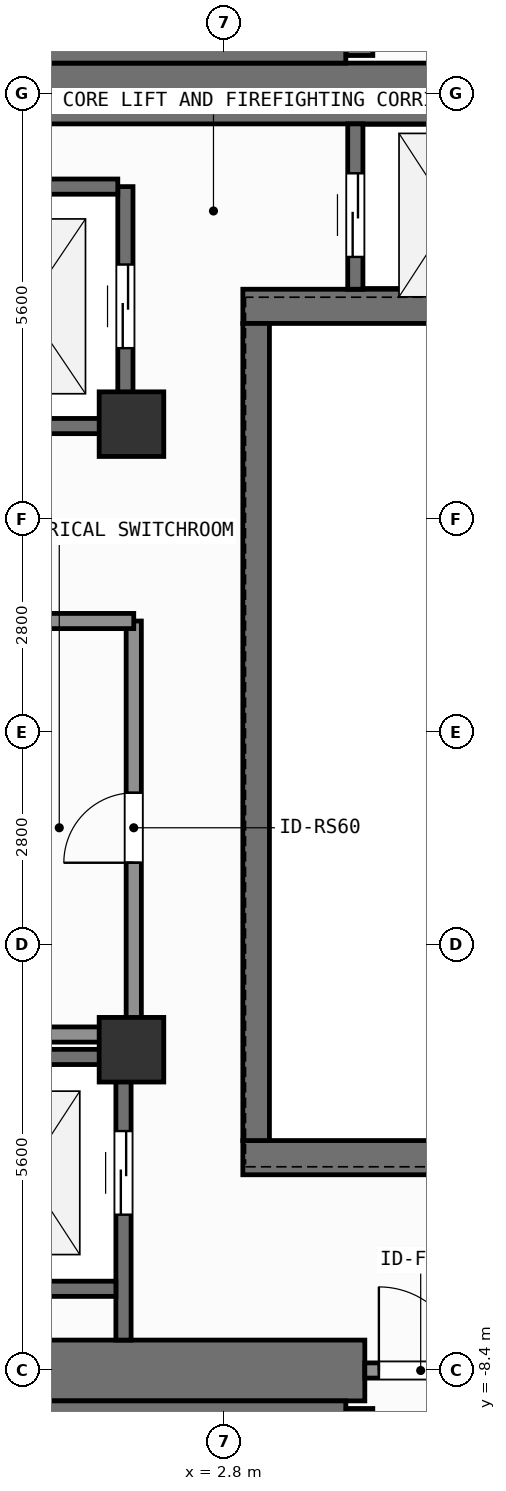
"""IFC4 building model, lengths in metres.
Left out: names, types, materials, properties, quantities, classifications, styles, units other than length and angle.
Written with IfcOpenShell. Run it as: python <this file> out.ifc"""

import sys

from ifc_helpers import new_model, si_unit, direction, frame, frame_2d, origin, origin_2d, place, context, subcontext, project, spatial, rectangle, extrude, element, fill, save


model = new_model("IFC4")
c1 = context("Model", 3, precision=1e-05, world=origin(), true_north=direction((0.0, 1.0)))
c2 = subcontext(c1, "Body", "Model", "MODEL_VIEW")
j1 = project(units=[si_unit("LENGTHUNIT", "METRE"), si_unit("PLANEANGLEUNIT", "RADIAN")], contexts=[c1])
p1 = place(None, origin())
s1 = spatial("IfcSite", under=j1, at=p1, CompositionType="ELEMENT")
p2 = place(p1, origin())
s2 = spatial("IfcBuilding", under=s1, at=p2, CompositionType="ELEMENT")
p3 = place(p2, frame((0.0, 0.0, 187.5)))
s3 = spatial("IfcBuildingStorey", under=s2, at=p3, CompositionType="ELEMENT", Elevation=187.5)
p4 = place(p3, frame((-2.62, -8.4, 0.0), z_axis=(0.0, 0.0, 1.0), x_axis=(1.0, 0.0, 0.0)))
e1 = element("IfcWall", 1, at=p4, inside=s3, PredefinedType="SHEAR", context=c2, shape_type="SweptSolid", body=[
    extrude(rectangle(XDim=7.27, YDim=0.8, at=frame_2d((3.635, 0.0))), origin(), (0.0, 0.0, 1.0), 3.9),
])
p5 = place(p3, frame((-7.55, 8.4, 0.0), z_axis=(0.0, 0.0, 1.0), x_axis=(1.0, 0.0, 0.0)))
e2 = element("IfcWall", 2, at=p5, inside=s3, PredefinedType="SHEAR", context=c2, shape_type="SweptSolid", body=[
    extrude(rectangle(XDim=16.35, YDim=0.8, at=frame_2d((8.175, 0.0))), origin(), (0.0, 0.0, 1.0), 3.9),
])
for number, where, z_axis, x_axis in (
    (3, (3.045, -5.6, 0.0), (0.0, 0.0, 1.0), (1.0, 0.0, 0.0)),
    (4, (3.045, 5.6, 0.0), (0.0, 0.0, 1.0), (1.0, 0.0, 0.0)),
):
    element("IfcWall", number, at=place(p3, frame(where, z_axis=z_axis, x_axis=x_axis)), inside=s3, PredefinedType="SHEAR", context=c2, shape_type="SweptSolid", body=[
        extrude(rectangle(XDim=5.755, YDim=0.45, at=frame_2d((2.877, 0.0))), origin(), (0.0, 0.0, 1.0), 3.9),
    ])
p6 = place(p3, frame((3.22, -5.375, 0.0), z_axis=(0.0, 0.0, 1.0), x_axis=(0.0, 1.0, 0.0)))
e5 = element("IfcWall", 5, at=p6, inside=s3, PredefinedType="SHEAR", context=c2, shape_type="SweptSolid", body=[
    extrude(rectangle(XDim=10.75, YDim=0.35, at=frame_2d((5.375, 0.0))), origin(), (0.0, 0.0, 1.0), 3.9),
])
p7 = place(p3, frame((-2.2, -8.913, 0.0), z_axis=(0.0, 0.0, 1.0), x_axis=(1.0, 0.0, 0.0)))
e6 = element("IfcWall", 6, at=p7, inside=s3, PredefinedType="SHEAR", context=c2, shape_type="SweptSolid", body=[
    extrude(rectangle(XDim=6.6, YDim=0.225, at=frame_2d((3.3, 0.0))), origin(), (0.0, 0.0, 1.0), 3.9),
])
p8 = place(p3, frame((4.58, -8.9, 0.0), z_axis=(0.0, 0.0, 1.0), x_axis=(0.0, -1.0, 0.0)))
e7 = element("IfcWall", 7, at=p8, inside=s3, PredefinedType="SHEAR", context=c2, shape_type="SweptSolid", body=[
    extrude(rectangle(XDim=2.925, YDim=0.35, at=frame_2d((1.462, 0.0))), origin(), (0.0, 0.0, 1.0), 3.9),
])
p9 = place(p8, frame((0.913, 0.0, 0.0)))
e8 = element("IfcOpeningElement", 8, at=p9, cuts=e7, PredefinedType="OPENING", context=c2, shape_type="SweptSolid", body=[
    extrude(rectangle(XDim=1.1, YDim=2.15, at=frame_2d((0.55, 1.075))), frame((0.0, 0.185, 0.0), z_axis=(0.0, -1.0, 0.0), x_axis=(1.0, 0.0, 0.0)), (0.0, 0.0, 1.0), 0.37),
])
p10 = place(p3, frame((-2.2, 8.913, 0.0), z_axis=(0.0, 0.0, 1.0), x_axis=(1.0, 0.0, 0.0)))
e9 = element("IfcWall", 9, at=p10, inside=s3, PredefinedType="SHEAR", context=c2, shape_type="SweptSolid", body=[
    extrude(rectangle(XDim=6.6, YDim=0.225, at=frame_2d((3.3, 0.0))), origin(), (0.0, 0.0, 1.0), 3.9),
])
p11 = place(p3, frame((4.58, 11.825, 0.0), z_axis=(0.0, 0.0, 1.0), x_axis=(0.0, -1.0, 0.0)))
e10 = element("IfcWall", 10, at=p11, inside=s3, PredefinedType="SHEAR", context=c2, shape_type="SweptSolid", body=[
    extrude(rectangle(XDim=2.925, YDim=0.35, at=frame_2d((1.462, 0.0))), origin(), (0.0, 0.0, 1.0), 3.9),
])
p12 = place(p11, frame((0.913, 0.0, 0.0)))
e11 = element("IfcOpeningElement", 11, at=p12, cuts=e10, PredefinedType="OPENING", context=c2, shape_type="SweptSolid", body=[
    extrude(rectangle(XDim=1.1, YDim=2.15, at=frame_2d((0.55, 1.075))), frame((0.0, 0.185, 0.0), z_axis=(0.0, -1.0, 0.0), x_axis=(1.0, 0.0, 0.0)), (0.0, 0.0, 1.0), 0.37),
])
for number, where, z_axis, x_axis in (
    (12, (1.58, -4.18, 0.0), (0.0, 0.0, 1.0), (1.0, 0.0, 0.0)),
    (13, (1.58, 4.05, 0.0), (0.0, 0.0, 1.0), (1.0, 0.0, 0.0)),
):
    element("IfcColumn", number, at=place(p3, frame(where, z_axis=z_axis, x_axis=x_axis)), inside=s3, PredefinedType="COLUMN", context=c2, shape_type="SweptSolid", body=[
        extrude(rectangle(XDim=0.85, YDim=0.85, at=origin_2d()), origin(), (0.0, 0.0, 1.0), 3.9),
    ])
p13 = place(p3, frame((1.5, 4.025, 0.0), z_axis=(0.0, 0.0, 1.0), x_axis=(0.0, 1.0, 0.0)))
e14 = element("IfcWall", 14, at=p13, inside=s3, PredefinedType="SHEAR", context=c2, shape_type="SweptSolid", body=[
    extrude(rectangle(XDim=3.15, YDim=0.2, at=frame_2d((1.575, 0.0))), origin(), (0.0, 0.0, 1.0), 3.62),
])
p14 = place(p13, frame((1.025, 0.0, 0.0)))
e15 = element("IfcOpeningElement", 15, at=p14, cuts=e14, PredefinedType="OPENING", context=c2, shape_type="SweptSolid", body=[
    extrude(rectangle(XDim=1.1, YDim=2.2, at=frame_2d((0.55, 1.1))), frame((0.0, 0.11, 0.0), z_axis=(0.0, -1.0, 0.0), x_axis=(1.0, 0.0, 0.0)), (0.0, 0.0, 1.0), 0.22),
])
for number, where, z_axis, x_axis in (
    (16, (-1.0, 4.025, 0.0), (0.0, 0.0, 1.0), (1.0, 0.0, 0.0)),
    (17, (-1.0, 7.175, 0.0), (0.0, 0.0, 1.0), (1.0, 0.0, 0.0)),
):
    element("IfcWall", number, at=place(p3, frame(where, z_axis=z_axis, x_axis=x_axis)), inside=s3, PredefinedType="SHEAR", context=c2, shape_type="SweptSolid", body=[
        extrude(rectangle(XDim=2.4, YDim=0.2, at=frame_2d((1.2, 0.0))), origin(), (0.0, 0.0, 1.0), 3.62),
    ])
p15 = place(p3, frame((1.475, -8.0, 0.0), z_axis=(0.0, 0.0, 1.0), x_axis=(0.0, 1.0, 0.0)))
e18 = element("IfcWall", 18, at=p15, inside=s3, PredefinedType="SHEAR", context=c2, shape_type="SweptSolid", body=[
    extrude(rectangle(XDim=3.725, YDim=0.2, at=frame_2d((1.863, 0.0))), origin(), (0.0, 0.0, 1.0), 3.62),
])
p16 = place(p15, frame((1.65, 0.0, 0.0)))
e19 = element("IfcOpeningElement", 19, at=p16, cuts=e18, PredefinedType="OPENING", context=c2, shape_type="SweptSolid", body=[
    extrude(rectangle(XDim=1.1, YDim=2.2, at=frame_2d((0.55, 1.1))), frame((0.0, 0.11, 0.0), z_axis=(0.0, -1.0, 0.0), x_axis=(1.0, 0.0, 0.0)), (0.0, 0.0, 1.0), 0.22),
])
for number, where, z_axis, x_axis in (
    (20, (-0.975, -7.325, 0.0), (0.0, 0.0, 1.0), (1.0, 0.0, 0.0)),
    (21, (-0.975, -4.275, 0.0), (0.0, 0.0, 1.0), (1.0, 0.0, 0.0)),
):
    element("IfcWall", number, at=place(p3, frame(where, z_axis=z_axis, x_axis=x_axis)), inside=s3, PredefinedType="SHEAR", context=c2, shape_type="SweptSolid", body=[
        extrude(rectangle(XDim=2.35, YDim=0.2, at=frame_2d((1.175, 0.0))), origin(), (0.0, 0.0, 1.0), 3.62),
    ])
p17 = place(p3, frame((4.525, 5.825, 0.0), z_axis=(0.0, 0.0, 1.0), x_axis=(0.0, 1.0, 0.0)))
e22 = element("IfcWall", 22, at=p17, inside=s3, PredefinedType="SHEAR", context=c2, shape_type="SweptSolid", body=[
    extrude(rectangle(XDim=2.175, YDim=0.2, at=frame_2d((1.087, 0.0))), origin(), (0.0, 0.0, 1.0), 3.62),
])
p18 = place(p17, frame((0.425, 0.0, 0.0)))
e23 = element("IfcOpeningElement", 23, at=p18, cuts=e22, PredefinedType="OPENING", context=c2, shape_type="SweptSolid", body=[
    extrude(rectangle(XDim=1.1, YDim=2.2, at=frame_2d((0.55, 1.1))), frame((0.0, 0.11, 0.0), z_axis=(0.0, -1.0, 0.0), x_axis=(1.0, 0.0, 0.0)), (0.0, 0.0, 1.0), 0.22),
])
p19 = place(p3, frame((4.65, -8.4, 0.0), z_axis=(0.0, 0.0, 1.0), x_axis=(1.0, 0.0, 0.0)))
e24 = element("IfcWall", 24, at=p19, inside=s3, PredefinedType="SOLIDWALL", context=c2, shape_type="SweptSolid", body=[
    extrude(rectangle(XDim=1.47, YDim=0.2, at=frame_2d((0.735, 0.0))), origin(), (0.0, 0.0, 1.0), 2.76),
])
p20 = place(p19, frame((0.185, 0.0, 0.0)))
e25 = element("IfcOpeningElement", 25, at=p20, cuts=e24, PredefinedType="OPENING", context=c2, shape_type="SweptSolid", body=[
    extrude(rectangle(XDim=1.1, YDim=2.15, at=frame_2d((0.55, 1.075))), frame((0.0, 0.11, 0.0), z_axis=(0.0, -1.0, 0.0), x_axis=(1.0, 0.0, 0.0)), (0.0, 0.0, 1.0), 0.22),
])
p21 = place(p3, frame((1.61, -3.98, 0.0), z_axis=(0.0, 0.0, 1.0), x_axis=(0.0, 1.0, 0.0)))
e26 = element("IfcWall", 26, at=p21, inside=s3, PredefinedType="SOLIDWALL", context=c2, shape_type="SweptSolid", body=[
    extrude(rectangle(XDim=5.44, YDim=0.2, at=frame_2d((2.72, 0.0))), origin(), (0.0, 0.0, 1.0), 3.62),
])
p22 = place(p21, frame((2.26, 0.0, 0.0)))
e27 = element("IfcOpeningElement", 27, at=p22, cuts=e26, PredefinedType="OPENING", context=c2, shape_type="SweptSolid", body=[
    extrude(rectangle(XDim=0.92, YDim=2.1, at=frame_2d((0.46, 1.05))), frame((0.0, 0.11, 0.0), z_axis=(0.0, -1.0, 0.0), x_axis=(1.0, 0.0, 0.0)), (0.0, 0.0, 1.0), 0.22),
])
for number, where, z_axis, x_axis in (
    (28, (-1.58, -3.98, 0.0), (0.0, 0.0, 1.0), (1.0, 0.0, 0.0)),
    (29, (-1.58, 1.46, 0.0), (0.0, 0.0, 1.0), (1.0, 0.0, 0.0)),
):
    element("IfcWall", number, at=place(p3, frame(where, z_axis=z_axis, x_axis=x_axis)), inside=s3, PredefinedType="SOLIDWALL", context=c2, shape_type="SweptSolid", body=[
        extrude(rectangle(XDim=3.19, YDim=0.2, at=frame_2d((1.595, 0.0))), origin(), (0.0, 0.0, 1.0), 3.62),
    ])
p23 = place(p14, origin())
e30 = element("IfcDoor", 30, at=p23, inside=s3, OperationType="SLIDING_TO_LEFT", PredefinedType="DOOR", context=c2, shape_type="SweptSolid", body=[
    extrude(rectangle(XDim=1.1, YDim=2.2, at=frame_2d((0.55, 1.1))), frame((0.0, 0.025, 0.0), z_axis=(0.0, -1.0, 0.0), x_axis=(1.0, 0.0, 0.0)), (0.0, 0.0, 1.0), 0.05),
])
fill(e15, e30)
p24 = place(p16, origin())
e31 = element("IfcDoor", 31, at=p24, inside=s3, OperationType="SLIDING_TO_LEFT", PredefinedType="DOOR", context=c2, shape_type="SweptSolid", body=[
    extrude(rectangle(XDim=1.1, YDim=2.2, at=frame_2d((0.55, 1.1))), frame((0.0, 0.025, 0.0), z_axis=(0.0, -1.0, 0.0), x_axis=(1.0, 0.0, 0.0)), (0.0, 0.0, 1.0), 0.05),
])
fill(e19, e31)
p25 = place(p18, origin())
e32 = element("IfcDoor", 32, at=p25, inside=s3, OperationType="SLIDING_TO_LEFT", PredefinedType="DOOR", context=c2, shape_type="SweptSolid", body=[
    extrude(rectangle(XDim=1.1, YDim=2.2, at=frame_2d((0.55, 1.1))), frame((0.0, 0.025, 0.0), z_axis=(0.0, -1.0, 0.0), x_axis=(1.0, 0.0, 0.0)), (0.0, 0.0, 1.0), 0.05),
])
fill(e23, e32)
p26 = place(p20, origin())
e33 = element("IfcDoor", 33, at=p26, inside=s3, OperationType="SINGLE_SWING_LEFT", PredefinedType="DOOR", context=c2, shape_type="SweptSolid", body=[
    extrude(rectangle(XDim=1.1, YDim=2.15, at=frame_2d((0.55, 1.075))), frame((0.0, 0.025, 0.0), z_axis=(0.0, -1.0, 0.0), x_axis=(1.0, 0.0, 0.0)), (0.0, 0.0, 1.0), 0.05),
])
fill(e25, e33)
p27 = place(p22, origin())
e34 = element("IfcDoor", 34, at=p27, inside=s3, OperationType="SINGLE_SWING_LEFT", PredefinedType="DOOR", context=c2, shape_type="SweptSolid", body=[
    extrude(rectangle(XDim=0.92, YDim=2.1, at=frame_2d((0.46, 1.05))), frame((0.0, 0.025, 0.0), z_axis=(0.0, -1.0, 0.0), x_axis=(1.0, 0.0, 0.0)), (0.0, 0.0, 1.0), 0.05),
])
fill(e27, e34)
save(model, sys.argv[1])
